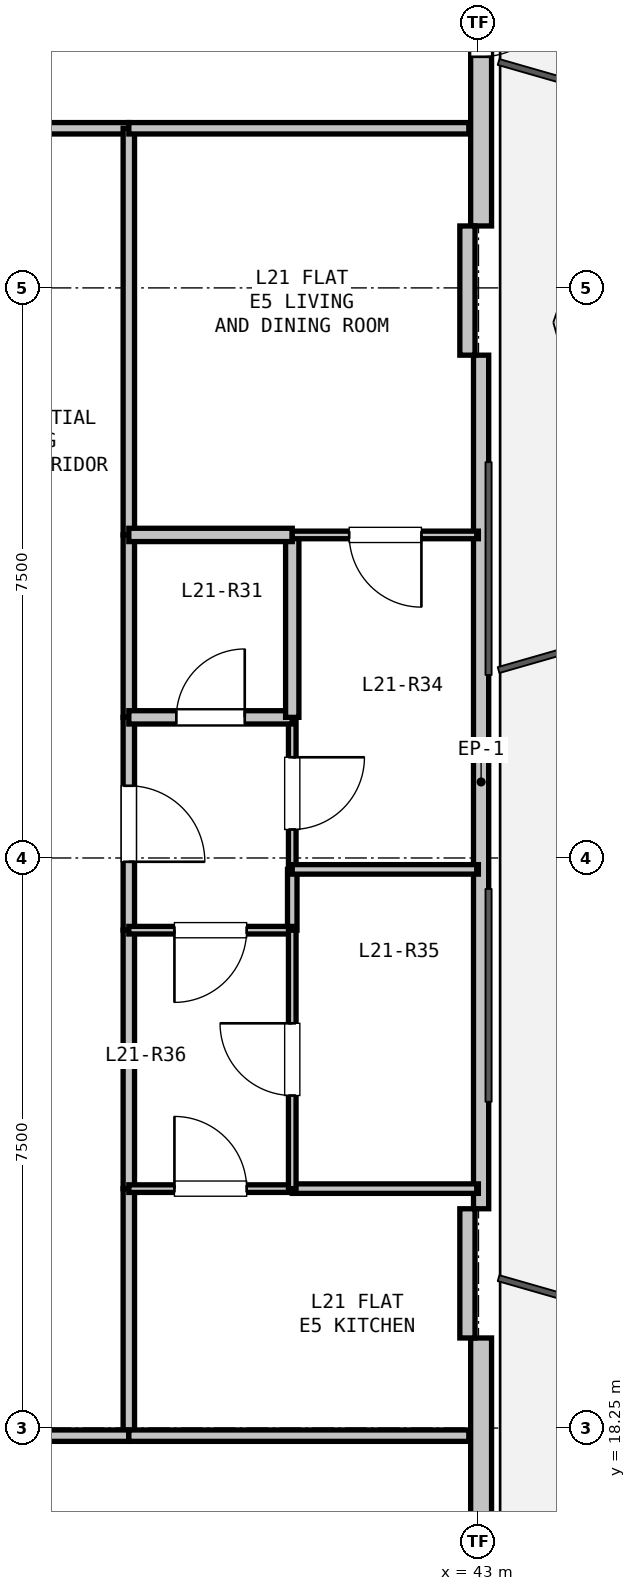
"""IFC4 building model, lengths in metres.
Left out: names, types, materials, properties, quantities, classifications, styles, units other than length and angle.
Written with IfcOpenShell. Run it as: python <this file> out.ifc"""

import sys

from ifc_helpers import new_model, si_unit, direction, frame, frame_2d, origin, place, context, subcontext, project, spatial, rectangle, extrude, element, fill, save


model = new_model("IFC4")
c1 = context("Model", 3, precision=1e-05, world=origin(), true_north=direction((0.0, 1.0)))
c2 = subcontext(c1, "Body", "Model", "MODEL_VIEW")
j1 = project(units=[si_unit("LENGTHUNIT", "METRE"), si_unit("PLANEANGLEUNIT", "RADIAN")], contexts=[c1])
p1 = place(None, origin())
s1 = spatial("IfcSite", under=j1, at=p1, CompositionType="ELEMENT")
p2 = place(p1, origin())
s2 = spatial("IfcBuilding", under=s1, at=p2, CompositionType="ELEMENT")
p3 = place(p2, frame((0.0, 0.0, 80.1)))
s3 = spatial("IfcBuildingStorey", under=s2, at=p3, CompositionType="ELEMENT", Elevation=80.1)
p4 = place(p3, frame((43.035, 45.994, 0.0), z_axis=(0.0, 0.0, 1.0), x_axis=(0.0, -1.0, 0.0)))
e1 = element("IfcWall", 1, at=p4, inside=s3, PredefinedType="SOLIDWALL", context=c2, shape_type="SweptSolid", body=[
    extrude(rectangle(XDim=11.93, YDim=0.275, at=frame_2d((5.965, 0.0))), origin(), (0.0, 0.0, 1.0), 2.67),
])
p5 = place(p4, frame((8.704, 0.0, 0.0)))
e2 = element("IfcOpeningElement", 2, at=p5, cuts=e1, PredefinedType="OPENING", context=c2, shape_type="SweptSolid", body=[
    extrude(rectangle(XDim=1.0, YDim=2.1, at=frame_2d((0.5, 1.05))), frame((0.0, 0.147, 0.0), z_axis=(0.0, -1.0, 0.0), x_axis=(1.0, 0.0, 0.0)), (0.0, 0.0, 1.0), 0.295),
])
p6 = place(p4, frame((4.214, 0.0, 0.9)))
e3 = element("IfcOpeningElement", 3, at=p6, cuts=e1, PredefinedType="OPENING", context=c2, shape_type="SweptSolid", body=[
    extrude(rectangle(XDim=0.9, YDim=1.4, at=frame_2d((0.45, 0.7))), frame((0.0, 0.147, 0.0), z_axis=(0.0, -1.0, 0.0), x_axis=(1.0, 0.0, 0.0)), (0.0, 0.0, 1.0), 0.295),
])
p7 = place(p3, frame((43.035, 32.365, 0.0), z_axis=(0.0, 0.0, 1.0), x_axis=(0.0, -1.0, 0.0)))
e4 = element("IfcWall", 4, at=p7, inside=s3, PredefinedType="PARAPET", context=c2, shape_type="SweptSolid", body=[
    extrude(rectangle(XDim=11.229, YDim=0.2, at=frame_2d((5.615, 0.0))), origin(), (0.0, 0.0, 1.0), 0.2),
])
p8 = place(p3, frame((43.035, 19.435, 0.0), z_axis=(0.0, 0.0, 1.0), x_axis=(0.0, -1.0, 0.0)))
e5 = element("IfcWall", 5, at=p8, inside=s3, PredefinedType="SOLIDWALL", context=c2, shape_type="SweptSolid", body=[
    extrude(rectangle(XDim=11.93, YDim=0.275, at=frame_2d((5.965, 0.0))), origin(), (0.0, 0.0, 1.0), 2.67),
])
p9 = place(p8, frame((9.826, 0.0, 0.9)))
e6 = element("IfcOpeningElement", 6, at=p9, cuts=e5, PredefinedType="OPENING", context=c2, shape_type="SweptSolid", body=[
    extrude(rectangle(XDim=1.2, YDim=1.4, at=frame_2d((0.6, 0.7))), frame((0.0, 0.147, 0.0), z_axis=(0.0, -1.0, 0.0), x_axis=(1.0, 0.0, 0.0)), (0.0, 0.0, 1.0), 0.295),
])
for number, where, z_axis, x_axis in (
    (7, (42.854, 34.065, 0.0), (0.0, 0.0, 1.0), (0.0, -1.0, 0.0)),
    (8, (42.854, 21.135, 0.0), (0.0, 0.0, 1.0), (0.0, -1.0, 0.0)),
):
    element("IfcWall", number, at=place(p3, frame(where, z_axis=z_axis, x_axis=x_axis)), inside=s3, PredefinedType="PARAPET", context=c2, shape_type="SweptSolid", body=[
        extrude(rectangle(XDim=1.7, YDim=0.2, at=frame_2d((0.85, 0.0))), origin(), (0.0, 0.0, 1.0), 2.67),
    ])
p10 = place(p3, frame((35.8, 35.35, 0.0), z_axis=(0.0, 0.0, 1.0), x_axis=(1.0, 0.0, 0.0)))
e9 = element("IfcWall", 9, at=p10, inside=s3, PredefinedType="PARTITIONING", context=c2, shape_type="SweptSolid", body=[
    extrude(rectangle(XDim=2.6, YDim=0.15, at=frame_2d((1.3, 0.0))), origin(), (0.0, 0.0, 1.0), 2.423),
])
p11 = place(p3, frame((38.4, 35.35, 0.0), z_axis=(0.0, 0.0, 1.0), x_axis=(0.0, -1.0, 0.0)))
e10 = element("IfcWall", 10, at=p11, inside=s3, PredefinedType="PARTITIONING", context=c2, shape_type="SweptSolid", body=[
    extrude(rectangle(XDim=5.35, YDim=0.15, at=frame_2d((2.675, 0.0))), origin(), (0.0, 0.0, 1.0), 3.05),
])
p12 = place(p3, frame((38.4, 30.0, 0.0), z_axis=(0.0, 0.0, 1.0), x_axis=(0.0, -1.0, 0.0)))
e11 = element("IfcWall", 11, at=p12, inside=s3, PredefinedType="PARTITIONING", context=c2, shape_type="SweptSolid", body=[
    extrude(rectangle(XDim=2.4, YDim=0.15, at=frame_2d((1.2, 0.0))), origin(), (0.0, 0.0, 1.0), 3.05),
])
p13 = place(p3, frame((38.4, 27.6, 0.0), z_axis=(0.0, 0.0, 1.0), x_axis=(0.0, -1.0, 0.0)))
e12 = element("IfcWall", 12, at=p13, inside=s3, PredefinedType="PARTITIONING", context=c2, shape_type="SweptSolid", body=[
    extrude(rectangle(XDim=2.8, YDim=0.15, at=frame_2d((1.4, 0.0))), origin(), (0.0, 0.0, 1.0), 3.05),
])
p14 = place(p13, frame((0.9, 0.0, 0.0)))
e13 = element("IfcOpeningElement", 13, at=p14, cuts=e12, PredefinedType="OPENING", context=c2, shape_type="SweptSolid", body=[
    extrude(rectangle(XDim=1.0, YDim=2.15, at=frame_2d((0.5, 1.075))), frame((0.0, 0.085, 0.0), z_axis=(0.0, -1.0, 0.0), x_axis=(1.0, 0.0, 0.0)), (0.0, 0.0, 1.0), 0.17),
])
p15 = place(p3, frame((38.4, 24.8, 0.0), z_axis=(0.0, 0.0, 1.0), x_axis=(0.0, -1.0, 0.0)))
e14 = element("IfcWall", 14, at=p15, inside=s3, PredefinedType="PARTITIONING", context=c2, shape_type="SweptSolid", body=[
    extrude(rectangle(XDim=3.4, YDim=0.15, at=frame_2d((1.7, 0.0))), origin(), (0.0, 0.0, 1.0), 3.05),
])
p16 = place(p3, frame((38.4, 21.4, 0.0), z_axis=(0.0, 0.0, 1.0), x_axis=(0.0, -1.0, 0.0)))
e15 = element("IfcWall", 15, at=p16, inside=s3, PredefinedType="PARTITIONING", context=c2, shape_type="SweptSolid", body=[
    extrude(rectangle(XDim=3.25, YDim=0.15, at=frame_2d((1.625, 0.0))), origin(), (0.0, 0.0, 1.0), 3.05),
])
p17 = place(p3, frame((38.4, 18.15, 0.0), z_axis=(0.0, 0.0, 1.0), x_axis=(-1.0, 0.0, 0.0)))
e16 = element("IfcWall", 16, at=p17, inside=s3, PredefinedType="PARTITIONING", context=c2, shape_type="SweptSolid", body=[
    extrude(rectangle(XDim=2.6, YDim=0.15, at=frame_2d((1.3, 0.0))), origin(), (0.0, 0.0, 1.0), 2.423),
])
p18 = place(p3, frame((40.55, 27.6, 0.0), z_axis=(0.0, 0.0, 1.0), x_axis=(0.0, -1.0, 0.0)))
e17 = element("IfcWall", 17, at=p18, inside=s3, PredefinedType="PARTITIONING", context=c2, shape_type="SweptSolid", body=[
    extrude(rectangle(XDim=2.0, YDim=0.1, at=frame_2d((1.0, 0.0))), origin(), (0.0, 0.0, 1.0), 3.05),
])
p19 = place(p18, frame((0.525, 0.0, 0.0)))
e18 = element("IfcOpeningElement", 18, at=p19, cuts=e17, PredefinedType="OPENING", context=c2, shape_type="SweptSolid", body=[
    extrude(rectangle(XDim=0.95, YDim=2.1, at=frame_2d((0.475, 1.05))), frame((0.0, 0.06, 0.0), z_axis=(0.0, -1.0, 0.0), x_axis=(1.0, 0.0, 0.0)), (0.0, 0.0, 1.0), 0.12),
])
p20 = place(p3, frame((40.55, 25.6, 0.0), z_axis=(0.0, 0.0, 1.0), x_axis=(0.0, -1.0, 0.0)))
e19 = element("IfcWall", 19, at=p20, inside=s3, PredefinedType="PARTITIONING", context=c2, shape_type="SweptSolid", body=[
    extrude(rectangle(XDim=0.8, YDim=0.125, at=frame_2d((0.4, 0.0))), origin(), (0.0, 0.0, 1.0), 3.05),
])
p21 = place(p3, frame((40.55, 24.8, 0.0), z_axis=(0.0, 0.0, 1.0), x_axis=(-1.0, 0.0, 0.0)))
e20 = element("IfcWall", 20, at=p21, inside=s3, PredefinedType="PARTITIONING", context=c2, shape_type="SweptSolid", body=[
    extrude(rectangle(XDim=2.15, YDim=0.1, at=frame_2d((1.075, 0.0))), origin(), (0.0, 0.0, 1.0), 3.05),
])
p22 = place(p21, frame((0.6, 0.0, 0.0)))
e21 = element("IfcOpeningElement", 21, at=p22, cuts=e20, PredefinedType="OPENING", context=c2, shape_type="SweptSolid", body=[
    extrude(rectangle(XDim=0.95, YDim=2.1, at=frame_2d((0.475, 1.05))), frame((0.0, 0.06, 0.0), z_axis=(0.0, -1.0, 0.0), x_axis=(1.0, 0.0, 0.0)), (0.0, 0.0, 1.0), 0.12),
])
p23 = place(p3, frame((38.4, 27.6, 0.0), z_axis=(0.0, 0.0, 1.0), x_axis=(1.0, 0.0, 0.0)))
e22 = element("IfcWall", 22, at=p23, inside=s3, PredefinedType="PLUMBINGWALL", context=c2, shape_type="SweptSolid", body=[
    extrude(rectangle(XDim=2.15, YDim=0.175, at=frame_2d((1.075, 0.0))), origin(), (0.0, 0.0, 1.0), 3.05),
])
p24 = place(p23, frame((0.625, 0.0, 0.0)))
e23 = element("IfcOpeningElement", 23, at=p24, cuts=e22, PredefinedType="OPENING", context=c2, shape_type="SweptSolid", body=[
    extrude(rectangle(XDim=0.9, YDim=2.1, at=frame_2d((0.45, 1.05))), frame((0.0, 0.097, 0.0), z_axis=(0.0, -1.0, 0.0), x_axis=(1.0, 0.0, 0.0)), (0.0, 0.0, 1.0), 0.195),
])
p25 = place(p3, frame((38.4, 18.15, 0.0), z_axis=(0.0, 0.0, 1.0), x_axis=(1.0, 0.0, 0.0)))
e24 = element("IfcWall", 24, at=p25, inside=s3, PredefinedType="PARTITIONING", context=c2, shape_type="SweptSolid", body=[
    extrude(rectangle(XDim=4.473, YDim=0.15, at=frame_2d((2.237, 0.0))), origin(), (0.0, 0.0, 1.0), 2.365),
])
p26 = place(p3, frame((40.55, 30.0, 0.0), z_axis=(0.0, 0.0, 1.0), x_axis=(0.0, -1.0, 0.0)))
e25 = element("IfcWall", 25, at=p26, inside=s3, PredefinedType="PLUMBINGWALL", context=c2, shape_type="SweptSolid", body=[
    extrude(rectangle(XDim=2.4, YDim=0.175, at=frame_2d((1.2, 0.0))), origin(), (0.0, 0.0, 1.0), 3.05),
])
p27 = place(p3, frame((38.4, 30.0, 0.0), z_axis=(0.0, 0.0, 1.0), x_axis=(1.0, 0.0, 0.0)))
e26 = element("IfcWall", 26, at=p27, inside=s3, PredefinedType="PLUMBINGWALL", context=c2, shape_type="SweptSolid", body=[
    extrude(rectangle(XDim=2.15, YDim=0.175, at=frame_2d((1.075, 0.0))), origin(), (0.0, 0.0, 1.0), 3.05),
])
p28 = place(p3, frame((38.4, 21.4, 0.0), z_axis=(0.0, 0.0, 1.0), x_axis=(1.0, 0.0, 0.0)))
e27 = element("IfcWall", 27, at=p28, inside=s3, PredefinedType="PARTITIONING", context=c2, shape_type="SweptSolid", body=[
    extrude(rectangle(XDim=2.15, YDim=0.1, at=frame_2d((1.075, 0.0))), origin(), (0.0, 0.0, 1.0), 3.05),
])
p29 = place(p28, frame((0.6, 0.0, 0.0)))
e28 = element("IfcOpeningElement", 28, at=p29, cuts=e27, PredefinedType="OPENING", context=c2, shape_type="SweptSolid", body=[
    extrude(rectangle(XDim=0.95, YDim=2.1, at=frame_2d((0.475, 1.05))), frame((0.0, 0.06, 0.0), z_axis=(0.0, -1.0, 0.0), x_axis=(1.0, 0.0, 0.0)), (0.0, 0.0, 1.0), 0.12),
])
p30 = place(p3, frame((40.55, 21.4, 0.0), z_axis=(0.0, 0.0, 1.0), x_axis=(1.0, 0.0, 0.0)))
e29 = element("IfcWall", 29, at=p30, inside=s3, PredefinedType="PARTITIONING", context=c2, shape_type="SweptSolid", body=[
    extrude(rectangle(XDim=2.448, YDim=0.125, at=frame_2d((1.224, 0.0))), origin(), (0.0, 0.0, 1.0), 2.365),
])
p31 = place(p3, frame((42.873, 35.35, 0.0), z_axis=(0.0, 0.0, 1.0), x_axis=(-1.0, 0.0, 0.0)))
e30 = element("IfcWall", 30, at=p31, inside=s3, PredefinedType="PARTITIONING", context=c2, shape_type="SweptSolid", body=[
    extrude(rectangle(XDim=4.473, YDim=0.15, at=frame_2d((2.237, 0.0))), origin(), (0.0, 0.0, 1.0), 2.365),
])
p32 = place(p3, frame((42.999, 30.0, 0.0), z_axis=(0.0, 0.0, 1.0), x_axis=(-1.0, 0.0, 0.0)))
e31 = element("IfcWall", 31, at=p32, inside=s3, PredefinedType="PARTITIONING", context=c2, shape_type="SweptSolid", body=[
    extrude(rectangle(XDim=2.448, YDim=0.1, at=frame_2d((1.224, 0.0))), origin(), (0.0, 0.0, 1.0), 2.365),
])
p33 = place(p32, frame((0.749, 0.0, 0.0)))
e32 = element("IfcOpeningElement", 32, at=p33, cuts=e31, PredefinedType="OPENING", context=c2, shape_type="SweptSolid", body=[
    extrude(rectangle(XDim=0.95, YDim=2.1, at=frame_2d((0.475, 1.05))), frame((0.0, 0.06, 0.0), z_axis=(0.0, -1.0, 0.0), x_axis=(1.0, 0.0, 0.0)), (0.0, 0.0, 1.0), 0.12),
])
p34 = place(p3, frame((42.999, 25.6, 0.0), z_axis=(0.0, 0.0, 1.0), x_axis=(-1.0, 0.0, 0.0)))
e33 = element("IfcWall", 33, at=p34, inside=s3, PredefinedType="PARTITIONING", context=c2, shape_type="SweptSolid", body=[
    extrude(rectangle(XDim=2.448, YDim=0.125, at=frame_2d((1.224, 0.0))), origin(), (0.0, 0.0, 1.0), 2.365),
])
p35 = place(p3, frame((40.55, 21.4, 0.0), z_axis=(0.0, 0.0, 1.0), x_axis=(0.0, 1.0, 0.0)))
e34 = element("IfcWall", 34, at=p35, inside=s3, PredefinedType="PARTITIONING", context=c2, shape_type="SweptSolid", body=[
    extrude(rectangle(XDim=3.4, YDim=0.1, at=frame_2d((1.7, 0.0))), origin(), (0.0, 0.0, 1.0), 3.05),
])
p36 = place(p35, frame((1.225, 0.0, 0.0)))
e35 = element("IfcOpeningElement", 35, at=p36, cuts=e34, PredefinedType="OPENING", context=c2, shape_type="SweptSolid", body=[
    extrude(rectangle(XDim=0.95, YDim=2.1, at=frame_2d((0.475, 1.05))), frame((0.0, 0.06, 0.0), z_axis=(0.0, -1.0, 0.0), x_axis=(1.0, 0.0, 0.0)), (0.0, 0.0, 1.0), 0.12),
])
p37 = place(p5, origin())
e36 = element("IfcDoor", 36, at=p37, inside=s3, OperationType="SINGLE_SWING_LEFT", PredefinedType="DOOR", context=c2, shape_type="SweptSolid", body=[
    extrude(rectangle(XDim=1.0, YDim=2.1, at=frame_2d((0.5, 1.05))), frame((0.0, 0.025, 0.0), z_axis=(0.0, -1.0, 0.0), x_axis=(1.0, 0.0, 0.0)), (0.0, 0.0, 1.0), 0.05),
])
fill(e2, e36)
p38 = place(p14, origin())
e37 = element("IfcDoor", 37, at=p38, inside=s3, OperationType="SINGLE_SWING_RIGHT", PredefinedType="DOOR", context=c2, shape_type="SweptSolid", body=[
    extrude(rectangle(XDim=1.0, YDim=2.15, at=frame_2d((0.5, 1.075))), frame((0.0, 0.025, 0.0), z_axis=(0.0, -1.0, 0.0), x_axis=(1.0, 0.0, 0.0)), (0.0, 0.0, 1.0), 0.05),
])
fill(e13, e37)
p39 = place(p24, origin())
e38 = element("IfcDoor", 38, at=p39, inside=s3, OperationType="SINGLE_SWING_RIGHT", PredefinedType="DOOR", context=c2, shape_type="SweptSolid", body=[
    extrude(rectangle(XDim=0.9, YDim=2.1, at=frame_2d((0.45, 1.05))), frame((0.0, 0.025, 0.0), z_axis=(0.0, -1.0, 0.0), x_axis=(1.0, 0.0, 0.0)), (0.0, 0.0, 1.0), 0.05),
])
fill(e23, e38)
p40 = place(p19, origin())
e39 = element("IfcDoor", 39, at=p40, inside=s3, OperationType="SINGLE_SWING_LEFT", PredefinedType="DOOR", context=c2, shape_type="SweptSolid", body=[
    extrude(rectangle(XDim=0.95, YDim=2.1, at=frame_2d((0.475, 1.05))), frame((0.0, 0.025, 0.0), z_axis=(0.0, -1.0, 0.0), x_axis=(1.0, 0.0, 0.0)), (0.0, 0.0, 1.0), 0.05),
])
fill(e18, e39)
p41 = place(p22, origin())
e40 = element("IfcDoor", 40, at=p41, inside=s3, OperationType="SINGLE_SWING_RIGHT", PredefinedType="DOOR", context=c2, shape_type="SweptSolid", body=[
    extrude(rectangle(XDim=0.95, YDim=2.1, at=frame_2d((0.475, 1.05))), frame((0.0, 0.025, 0.0), z_axis=(0.0, -1.0, 0.0), x_axis=(1.0, 0.0, 0.0)), (0.0, 0.0, 1.0), 0.05),
])
fill(e21, e40)
p42 = place(p29, origin())
e41 = element("IfcDoor", 41, at=p42, inside=s3, OperationType="SINGLE_SWING_LEFT", PredefinedType="DOOR", context=c2, shape_type="SweptSolid", body=[
    extrude(rectangle(XDim=0.95, YDim=2.1, at=frame_2d((0.475, 1.05))), frame((0.0, 0.025, 0.0), z_axis=(0.0, -1.0, 0.0), x_axis=(1.0, 0.0, 0.0)), (0.0, 0.0, 1.0), 0.05),
])
fill(e28, e41)
p43 = place(p33, origin())
e42 = element("IfcDoor", 42, at=p43, inside=s3, OperationType="SINGLE_SWING_LEFT", PredefinedType="DOOR", context=c2, shape_type="SweptSolid", body=[
    extrude(rectangle(XDim=0.95, YDim=2.1, at=frame_2d((0.475, 1.05))), frame((0.0, 0.025, 0.0), z_axis=(0.0, -1.0, 0.0), x_axis=(1.0, 0.0, 0.0)), (0.0, 0.0, 1.0), 0.05),
])
fill(e32, e42)
p44 = place(p36, origin())
e43 = element("IfcDoor", 43, at=p44, inside=s3, OperationType="SINGLE_SWING_RIGHT", PredefinedType="DOOR", context=c2, shape_type="SweptSolid", body=[
    extrude(rectangle(XDim=0.95, YDim=2.1, at=frame_2d((0.475, 1.05))), frame((0.0, 0.025, 0.0), z_axis=(0.0, -1.0, 0.0), x_axis=(1.0, 0.0, 0.0)), (0.0, 0.0, 1.0), 0.05),
])
fill(e35, e43)
save(model, sys.argv[1])
